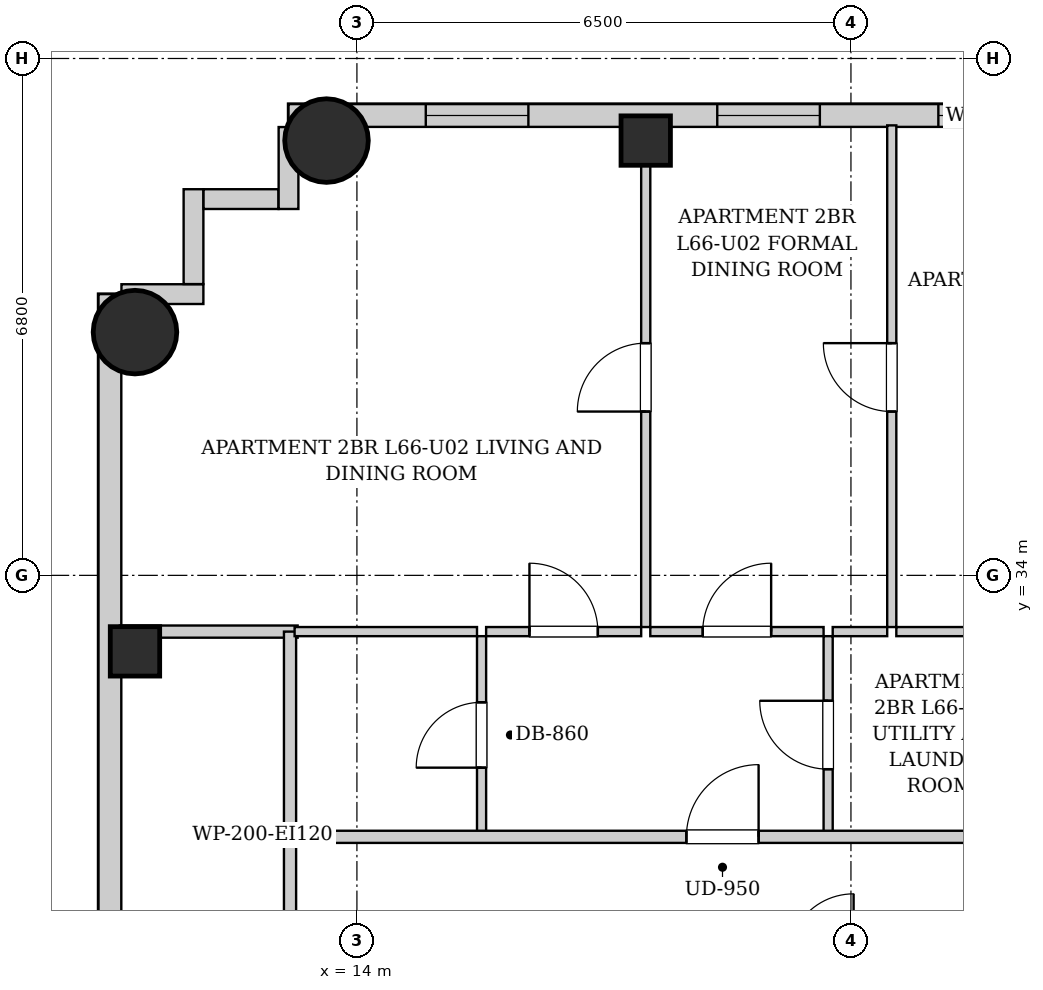
"""IFC4 building model, lengths in metres.
Left out: names, types, materials, properties, quantities, classifications, styles, units other than length and angle.
Written with IfcOpenShell. Run it as: python <this file> out.ifc"""

import sys

from ifc_helpers import new_model, si_unit, direction, frame, frame_2d, origin, origin_2d, place, context, subcontext, project, spatial, rectangle, circle, extrude, element, fill, save


model = new_model("IFC4")
c1 = context("Model", 3, precision=1e-05, world=origin(), true_north=direction((0.0, 1.0)))
c2 = subcontext(c1, "Body", "Model", "MODEL_VIEW")
j1 = project(units=[si_unit("LENGTHUNIT", "METRE"), si_unit("PLANEANGLEUNIT", "RADIAN")], contexts=[c1])
p1 = place(None, origin())
s1 = spatial("IfcSite", under=j1, at=p1, CompositionType="ELEMENT")
p2 = place(p1, origin())
s2 = spatial("IfcBuilding", under=s1, at=p2, CompositionType="ELEMENT")
p3 = place(p2, frame((0.0, 0.0, 227.5)))
s3 = spatial("IfcBuildingStorey", under=s2, at=p3, CompositionType="ELEMENT", Elevation=227.5)
p4 = place(p3, frame((13.6, 39.72, 0.0), z_axis=(0.0, 0.0, 1.0), x_axis=(1.0, 0.0, 0.0)))
e1 = element("IfcColumn", 1, at=p4, inside=s3, PredefinedType="COLUMN", context=c2, shape_type="SweptSolid", body=[
    extrude(circle(Radius=0.55, at=origin_2d()), origin(), (0.0, 0.0, 1.0), 3.4),
])
for number, where, z_axis, x_axis in (
    (2, (17.8, 39.72, 0.0), (0.0, 0.0, 1.0), (1.0, 0.0, 0.0)),
    (3, (11.08, 33.0, 0.0), (0.0, 0.0, 1.0), (1.0, 0.0, 0.0)),
):
    element("IfcColumn", number, at=place(p3, frame(where, z_axis=z_axis, x_axis=x_axis)), inside=s3, PredefinedType="COLUMN", context=c2, shape_type="SweptSolid", body=[
        extrude(rectangle(XDim=0.65, YDim=0.65, at=origin_2d()), origin(), (0.0, 0.0, 1.0), 3.4),
    ])
p5 = place(p3, frame((11.08, 37.2, 0.0), z_axis=(0.0, 0.0, 1.0), x_axis=(1.0, 0.0, 0.0)))
e4 = element("IfcColumn", 4, at=p5, inside=s3, PredefinedType="COLUMN", context=c2, shape_type="SweptSolid", body=[
    extrude(circle(Radius=0.55, at=origin_2d()), origin(), (0.0, 0.0, 1.0), 3.4),
])
p6 = place(p3, frame((13.1, 40.05, 0.0), z_axis=(0.0, 0.0, 1.0), x_axis=(1.0, 0.0, 0.0)))
e5 = element("IfcWall", 5, at=p6, inside=s3, PredefinedType="SOLIDWALL", context=c2, shape_type="SweptSolid", body=[
    extrude(rectangle(XDim=18.8, YDim=0.3, at=frame_2d((9.4, 0.0))), origin(), (0.0, 0.0, 1.0), 3.14),
])
p7 = place(p6, frame((1.806, 0.0, 0.55)))
e6 = element("IfcOpeningElement", 6, at=p7, cuts=e5, PredefinedType="OPENING", context=c2, shape_type="SweptSolid", body=[
    extrude(rectangle(XDim=1.35, YDim=1.2, at=frame_2d((0.675, 0.6))), frame((0.0, 0.16, 0.0), z_axis=(0.0, -1.0, 0.0), x_axis=(1.0, 0.0, 0.0)), (0.0, 0.0, 1.0), 0.32),
])
p8 = place(p6, frame((5.641, 0.0, 0.55)))
e7 = element("IfcOpeningElement", 7, at=p8, cuts=e5, PredefinedType="OPENING", context=c2, shape_type="SweptSolid", body=[
    extrude(rectangle(XDim=1.35, YDim=1.2, at=frame_2d((0.675, 0.6))), frame((0.0, 0.16, 0.0), z_axis=(0.0, -1.0, 0.0), x_axis=(1.0, 0.0, 0.0)), (0.0, 0.0, 1.0), 0.32),
])
p9 = place(p6, frame((8.55, 0.0, 0.55)))
e8 = element("IfcOpeningElement", 8, at=p9, cuts=e5, PredefinedType="OPENING", context=c2, shape_type="SweptSolid", body=[
    extrude(rectangle(XDim=0.85, YDim=1.2, at=frame_2d((0.425, 0.6))), frame((0.0, 0.16, 0.0), z_axis=(0.0, -1.0, 0.0), x_axis=(1.0, 0.0, 0.0)), (0.0, 0.0, 1.0), 0.32),
])
p10 = place(p6, frame((14.4, 0.0, 0.55)))
e9 = element("IfcOpeningElement", 9, at=p10, cuts=e5, PredefinedType="OPENING", context=c2, shape_type="SweptSolid", body=[
    extrude(rectangle(XDim=1.35, YDim=1.2, at=frame_2d((0.675, 0.6))), frame((0.0, 0.16, 0.0), z_axis=(0.0, -1.0, 0.0), x_axis=(1.0, 0.0, 0.0)), (0.0, 0.0, 1.0), 0.32),
])
p11 = place(p3, frame((10.75, 6.3, 0.0), z_axis=(0.0, 0.0, 1.0), x_axis=(0.0, 1.0, 0.0)))
e10 = element("IfcWall", 10, at=p11, inside=s3, PredefinedType="SOLIDWALL", context=c2, shape_type="SweptSolid", body=[
    extrude(rectangle(XDim=31.4, YDim=0.3, at=frame_2d((15.7, 0.0))), origin(), (0.0, 0.0, 1.0), 3.14),
])
p12 = place(p11, frame((1.653, 0.0, 0.55)))
e11 = element("IfcOpeningElement", 11, at=p12, cuts=e10, PredefinedType="OPENING", context=c2, shape_type="SweptSolid", body=[
    extrude(rectangle(XDim=1.35, YDim=1.2, at=frame_2d((0.675, 0.6))), frame((0.0, 0.16, 0.0), z_axis=(0.0, -1.0, 0.0), x_axis=(1.0, 0.0, 0.0)), (0.0, 0.0, 1.0), 0.32),
])
p13 = place(p11, frame((10.367, 0.0, 0.55)))
e12 = element("IfcOpeningElement", 12, at=p13, cuts=e10, PredefinedType="OPENING", context=c2, shape_type="SweptSolid", body=[
    extrude(rectangle(XDim=1.35, YDim=1.2, at=frame_2d((0.675, 0.6))), frame((0.0, 0.16, 0.0), z_axis=(0.0, -1.0, 0.0), x_axis=(1.0, 0.0, 0.0)), (0.0, 0.0, 1.0), 0.32),
])
p14 = place(p11, frame((19.683, 0.0, 0.55)))
e13 = element("IfcOpeningElement", 13, at=p14, cuts=e10, PredefinedType="OPENING", context=c2, shape_type="SweptSolid", body=[
    extrude(rectangle(XDim=1.35, YDim=1.2, at=frame_2d((0.675, 0.6))), frame((0.0, 0.16, 0.0), z_axis=(0.0, -1.0, 0.0), x_axis=(1.0, 0.0, 0.0)), (0.0, 0.0, 1.0), 0.32),
])
p15 = place(p3, frame((10.902, 37.7, 0.0), z_axis=(0.0, 0.0, 1.0), x_axis=(1.0, 0.0, 0.0)))
e14 = element("IfcWall", 14, at=p15, inside=s3, PredefinedType="SOLIDWALL", context=c2, shape_type="SweptSolid", body=[
    extrude(rectangle(XDim=1.078, YDim=0.26, at=frame_2d((0.539, 0.0))), origin(), (0.0, 0.0, 1.0), 3.14),
])
p16 = place(p3, frame((11.85, 37.832, 0.0), z_axis=(0.0, 0.0, 1.0), x_axis=(0.0, 1.0, 0.0)))
e15 = element("IfcWall", 15, at=p16, inside=s3, PredefinedType="SOLIDWALL", context=c2, shape_type="SweptSolid", body=[
    extrude(rectangle(XDim=1.248, YDim=0.26, at=frame_2d((0.624, 0.0))), origin(), (0.0, 0.0, 1.0), 3.14),
])
p17 = place(p3, frame((11.982, 38.95, 0.0), z_axis=(0.0, 0.0, 1.0), x_axis=(1.0, 0.0, 0.0)))
e16 = element("IfcWall", 16, at=p17, inside=s3, PredefinedType="SOLIDWALL", context=c2, shape_type="SweptSolid", body=[
    extrude(rectangle(XDim=0.986, YDim=0.26, at=frame_2d((0.493, 0.0))), origin(), (0.0, 0.0, 1.0), 3.14),
])
p18 = place(p3, frame((13.1, 38.82, 0.0), z_axis=(0.0, 0.0, 1.0), x_axis=(0.0, 1.0, 0.0)))
e17 = element("IfcWall", 17, at=p18, inside=s3, PredefinedType="SOLIDWALL", context=c2, shape_type="SweptSolid", body=[
    extrude(rectangle(XDim=1.078, YDim=0.26, at=frame_2d((0.539, 0.0))), origin(), (0.0, 0.0, 1.0), 3.14),
])
p19 = place(p3, frame((13.12, 28.98, 0.0), z_axis=(0.0, 0.0, 1.0), x_axis=(0.0, 1.0, 0.0)))
e18 = element("IfcWall", 18, at=p19, inside=s3, PredefinedType="PARTITIONING", context=c2, shape_type="SweptSolid", body=[
    extrude(rectangle(XDim=1.58, YDim=0.16, at=frame_2d((0.79, 0.0))), origin(), (0.0, 0.0, 1.0), 3.14),
])
p20 = place(p3, frame((10.88, 33.26, 0.0), z_axis=(0.0, 0.0, 1.0), x_axis=(1.0, 0.0, 0.0)))
e19 = element("IfcWall", 19, at=p20, inside=s3, PredefinedType="PARTITIONING", context=c2, shape_type="SweptSolid", body=[
    extrude(rectangle(XDim=2.34, YDim=0.16, at=frame_2d((1.17, 0.0))), origin(), (0.0, 0.0, 1.0), 3.14),
])
p21 = place(p3, frame((13.12, 30.6, 0.0), z_axis=(0.0, 0.0, 1.0), x_axis=(0.0, 1.0, 0.0)))
e20 = element("IfcWall", 20, at=p21, inside=s3, PredefinedType="PARTITIONING", context=c2, shape_type="SweptSolid", body=[
    extrude(rectangle(XDim=2.66, YDim=0.16, at=frame_2d((1.33, 0.0))), origin(), (0.0, 0.0, 1.0), 3.14),
])
p22 = place(p3, frame((15.64, 30.6, 0.0), z_axis=(0.0, 0.0, 1.0), x_axis=(0.0, 1.0, 0.0)))
e21 = element("IfcWall", 21, at=p22, inside=s3, PredefinedType="PARTITIONING", context=c2, shape_type="SweptSolid", body=[
    extrude(rectangle(XDim=2.6, YDim=0.12, at=frame_2d((1.3, 0.0))), origin(), (0.0, 0.0, 1.0), 3.14),
])
p23 = place(p22, frame((0.87, 0.0, 0.0)))
e22 = element("IfcOpeningElement", 22, at=p23, cuts=e21, PredefinedType="OPENING", context=c2, shape_type="SweptSolid", body=[
    extrude(rectangle(XDim=0.86, YDim=2.05, at=frame_2d((0.43, 1.025))), frame((0.0, 0.07, 0.0), z_axis=(0.0, -1.0, 0.0), x_axis=(1.0, 0.0, 0.0)), (0.0, 0.0, 1.0), 0.14),
])
p24 = place(p3, frame((13.18, 33.26, 0.0), z_axis=(0.0, 0.0, 1.0), x_axis=(1.0, 0.0, 0.0)))
e23 = element("IfcWall", 23, at=p24, inside=s3, PredefinedType="PARTITIONING", context=c2, shape_type="SweptSolid", body=[
    extrude(rectangle(XDim=2.4, YDim=0.12, at=frame_2d((1.2, 0.0))), origin(), (0.0, 0.0, 1.0), 3.14),
])
p25 = place(p3, frame((20.2, 30.6, 0.0), z_axis=(0.0, 0.0, 1.0), x_axis=(0.0, 1.0, 0.0)))
e24 = element("IfcWall", 24, at=p25, inside=s3, PredefinedType="PARTITIONING", context=c2, shape_type="SweptSolid", body=[
    extrude(rectangle(XDim=2.6, YDim=0.12, at=frame_2d((1.3, 0.0))), origin(), (0.0, 0.0, 1.0), 3.14),
])
p26 = place(p25, frame((0.85, 0.0, 0.0)))
e25 = element("IfcOpeningElement", 25, at=p26, cuts=e24, PredefinedType="OPENING", context=c2, shape_type="SweptSolid", body=[
    extrude(rectangle(XDim=0.9, YDim=2.05, at=frame_2d((0.45, 1.025))), frame((0.0, 0.07, 0.0), z_axis=(0.0, -1.0, 0.0), x_axis=(1.0, 0.0, 0.0)), (0.0, 0.0, 1.0), 0.14),
])
p27 = place(p3, frame((15.7, 33.26, 0.0), z_axis=(0.0, 0.0, 1.0), x_axis=(1.0, 0.0, 0.0)))
e26 = element("IfcWall", 26, at=p27, inside=s3, PredefinedType="PARTITIONING", context=c2, shape_type="SweptSolid", body=[
    extrude(rectangle(XDim=2.04, YDim=0.12, at=frame_2d((1.02, 0.0))), origin(), (0.0, 0.0, 1.0), 3.14),
])
p28 = place(p27, frame((0.57, 0.0, 0.0)))
e27 = element("IfcOpeningElement", 27, at=p28, cuts=e26, PredefinedType="OPENING", context=c2, shape_type="SweptSolid", body=[
    extrude(rectangle(XDim=0.9, YDim=2.05, at=frame_2d((0.45, 1.025))), frame((0.0, 0.07, 0.0), z_axis=(0.0, -1.0, 0.0), x_axis=(1.0, 0.0, 0.0)), (0.0, 0.0, 1.0), 0.14),
])
p29 = place(p3, frame((17.86, 33.26, 0.0), z_axis=(0.0, 0.0, 1.0), x_axis=(1.0, 0.0, 0.0)))
e28 = element("IfcWall", 28, at=p29, inside=s3, PredefinedType="PARTITIONING", context=c2, shape_type="SweptSolid", body=[
    extrude(rectangle(XDim=2.28, YDim=0.12, at=frame_2d((1.14, 0.0))), origin(), (0.0, 0.0, 1.0), 3.14),
])
p30 = place(p29, frame((0.69, 0.0, 0.0)))
e29 = element("IfcOpeningElement", 29, at=p30, cuts=e28, PredefinedType="OPENING", context=c2, shape_type="SweptSolid", body=[
    extrude(rectangle(XDim=0.9, YDim=2.05, at=frame_2d((0.45, 1.025))), frame((0.0, 0.07, 0.0), z_axis=(0.0, -1.0, 0.0), x_axis=(1.0, 0.0, 0.0)), (0.0, 0.0, 1.0), 0.14),
])
p31 = place(p3, frame((20.26, 33.26, 0.0), z_axis=(0.0, 0.0, 1.0), x_axis=(1.0, 0.0, 0.0)))
e30 = element("IfcWall", 30, at=p31, inside=s3, PredefinedType="PARTITIONING", context=c2, shape_type="SweptSolid", body=[
    extrude(rectangle(XDim=0.717, YDim=0.12, at=frame_2d((0.358, 0.0))), origin(), (0.0, 0.0, 1.0), 3.14),
])
p32 = place(p3, frame((21.097, 33.26, 0.0), z_axis=(0.0, 0.0, 1.0), x_axis=(1.0, 0.0, 0.0)))
e31 = element("IfcWall", 31, at=p32, inside=s3, PredefinedType="PARTITIONING", context=c2, shape_type="SweptSolid", body=[
    extrude(rectangle(XDim=2.763, YDim=0.12, at=frame_2d((1.382, 0.0))), origin(), (0.0, 0.0, 1.0), 3.14),
])
p33 = place(p32, frame((0.931, 0.0, 0.0)))
e32 = element("IfcOpeningElement", 32, at=p33, cuts=e31, PredefinedType="OPENING", context=c2, shape_type="SweptSolid", body=[
    extrude(rectangle(XDim=0.9, YDim=2.05, at=frame_2d((0.45, 1.025))), frame((0.0, 0.07, 0.0), z_axis=(0.0, -1.0, 0.0), x_axis=(1.0, 0.0, 0.0)), (0.0, 0.0, 1.0), 0.14),
])
p34 = place(p3, frame((17.8, 33.32, 0.0), z_axis=(0.0, 0.0, 1.0), x_axis=(0.0, 1.0, 0.0)))
e33 = element("IfcWall", 33, at=p34, inside=s3, PredefinedType="PARTITIONING", context=c2, shape_type="SweptSolid", body=[
    extrude(rectangle(XDim=6.6, YDim=0.12, at=frame_2d((3.3, 0.0))), origin(), (0.0, 0.0, 1.0), 2.668),
])
p35 = place(p34, frame((2.835, 0.0, 0.0)))
e34 = element("IfcOpeningElement", 34, at=p35, cuts=e33, PredefinedType="OPENING", context=c2, shape_type="SweptSolid", body=[
    extrude(rectangle(XDim=0.9, YDim=2.05, at=frame_2d((0.45, 1.025))), frame((0.0, 0.07, 0.0), z_axis=(0.0, -1.0, 0.0), x_axis=(1.0, 0.0, 0.0)), (0.0, 0.0, 1.0), 0.14),
])
p36 = place(p3, frame((21.037, 33.32, 0.0), z_axis=(0.0, 0.0, 1.0), x_axis=(0.0, 1.0, 0.0)))
e35 = element("IfcWall", 35, at=p36, inside=s3, PredefinedType="PARTITIONING", context=c2, shape_type="SweptSolid", body=[
    extrude(rectangle(XDim=6.6, YDim=0.12, at=frame_2d((3.3, 0.0))), origin(), (0.0, 0.0, 1.0), 3.14),
])
p37 = place(p36, frame((2.835, 0.0, 0.0)))
e36 = element("IfcOpeningElement", 36, at=p37, cuts=e35, PredefinedType="OPENING", context=c2, shape_type="SweptSolid", body=[
    extrude(rectangle(XDim=0.9, YDim=2.05, at=frame_2d((0.45, 1.025))), frame((0.0, 0.07, 0.0), z_axis=(0.0, -1.0, 0.0), x_axis=(1.0, 0.0, 0.0)), (0.0, 0.0, 1.0), 0.14),
])
p38 = place(p3, frame((13.15, 30.56, 0.0), z_axis=(0.0, 0.0, 1.0), x_axis=(1.0, 0.0, 0.0)))
e37 = element("IfcWall", 37, at=p38, inside=s3, PredefinedType="PARTITIONING", context=c2, shape_type="SweptSolid", body=[
    extrude(rectangle(XDim=24.6, YDim=0.16, at=frame_2d((12.3, 0.0))), origin(), (0.0, 0.0, 1.0), 3.14),
])
p39 = place(p38, frame((5.185, 0.0, 0.0)))
e38 = element("IfcOpeningElement", 38, at=p39, cuts=e37, PredefinedType="OPENING", context=c2, shape_type="SweptSolid", body=[
    extrude(rectangle(XDim=0.95, YDim=2.1, at=frame_2d((0.475, 1.05))), frame((0.0, 0.09, 0.0), z_axis=(0.0, -1.0, 0.0), x_axis=(1.0, 0.0, 0.0)), (0.0, 0.0, 1.0), 0.18),
])
p40 = place(p38, frame((21.55, 0.0, 0.0)))
e39 = element("IfcOpeningElement", 39, at=p40, cuts=e37, PredefinedType="OPENING", context=c2, shape_type="SweptSolid", body=[
    extrude(rectangle(XDim=0.95, YDim=2.1, at=frame_2d((0.475, 1.05))), frame((0.0, 0.09, 0.0), z_axis=(0.0, -1.0, 0.0), x_axis=(1.0, 0.0, 0.0)), (0.0, 0.0, 1.0), 0.18),
])
p41 = place(p23, origin())
e40 = element("IfcDoor", 40, at=p41, inside=s3, OperationType="SINGLE_SWING_LEFT", PredefinedType="DOOR", context=c2, shape_type="SweptSolid", body=[
    extrude(rectangle(XDim=0.86, YDim=2.05, at=frame_2d((0.43, 1.025))), frame((0.0, 0.025, 0.0), z_axis=(0.0, -1.0, 0.0), x_axis=(1.0, 0.0, 0.0)), (0.0, 0.0, 1.0), 0.05),
])
fill(e22, e40)
p42 = place(p26, origin())
e41 = element("IfcDoor", 41, at=p42, inside=s3, OperationType="SINGLE_SWING_RIGHT", PredefinedType="DOOR", context=c2, shape_type="SweptSolid", body=[
    extrude(rectangle(XDim=0.9, YDim=2.05, at=frame_2d((0.45, 1.025))), frame((0.0, 0.025, 0.0), z_axis=(0.0, -1.0, 0.0), x_axis=(1.0, 0.0, 0.0)), (0.0, 0.0, 1.0), 0.05),
])
fill(e25, e41)
p43 = place(p28, origin())
e42 = element("IfcDoor", 42, at=p43, inside=s3, OperationType="SINGLE_SWING_LEFT", PredefinedType="DOOR", context=c2, shape_type="SweptSolid", body=[
    extrude(rectangle(XDim=0.9, YDim=2.05, at=frame_2d((0.45, 1.025))), frame((0.0, 0.025, 0.0), z_axis=(0.0, -1.0, 0.0), x_axis=(1.0, 0.0, 0.0)), (0.0, 0.0, 1.0), 0.05),
])
fill(e27, e42)
p44 = place(p30, origin())
e43 = element("IfcDoor", 43, at=p44, inside=s3, OperationType="SINGLE_SWING_RIGHT", PredefinedType="DOOR", context=c2, shape_type="SweptSolid", body=[
    extrude(rectangle(XDim=0.9, YDim=2.05, at=frame_2d((0.45, 1.025))), frame((0.0, 0.025, 0.0), z_axis=(0.0, -1.0, 0.0), x_axis=(1.0, 0.0, 0.0)), (0.0, 0.0, 1.0), 0.05),
])
fill(e29, e43)
p45 = place(p35, origin())
e44 = element("IfcDoor", 44, at=p45, inside=s3, OperationType="SINGLE_SWING_LEFT", PredefinedType="DOOR", context=c2, shape_type="SweptSolid", body=[
    extrude(rectangle(XDim=0.9, YDim=2.05, at=frame_2d((0.45, 1.025))), frame((0.0, 0.025, 0.0), z_axis=(0.0, -1.0, 0.0), x_axis=(1.0, 0.0, 0.0)), (0.0, 0.0, 1.0), 0.05),
])
fill(e34, e44)
p46 = place(p37, origin())
e45 = element("IfcDoor", 45, at=p46, inside=s3, OperationType="SINGLE_SWING_RIGHT", PredefinedType="DOOR", context=c2, shape_type="SweptSolid", body=[
    extrude(rectangle(XDim=0.9, YDim=2.05, at=frame_2d((0.45, 1.025))), frame((0.0, 0.025, 0.0), z_axis=(0.0, -1.0, 0.0), x_axis=(1.0, 0.0, 0.0)), (0.0, 0.0, 1.0), 0.05),
])
fill(e36, e45)
p47 = place(p39, origin())
e46 = element("IfcDoor", 46, at=p47, inside=s3, OperationType="SINGLE_SWING_RIGHT", PredefinedType="DOOR", context=c2, shape_type="SweptSolid", body=[
    extrude(rectangle(XDim=0.95, YDim=2.1, at=frame_2d((0.475, 1.05))), frame((0.0, 0.025, 0.0), z_axis=(0.0, -1.0, 0.0), x_axis=(1.0, 0.0, 0.0)), (0.0, 0.0, 1.0), 0.05),
])
fill(e38, e46)
p48 = place(p7, origin())
e47 = element("IfcWindow", 47, at=p48, inside=s3, PartitioningType="SINGLE_PANEL", PredefinedType="WINDOW", context=c2, shape_type="SweptSolid", body=[
    extrude(rectangle(XDim=1.35, YDim=1.2, at=frame_2d((0.675, 0.6))), frame((0.0, 0.03, 0.0), z_axis=(0.0, -1.0, 0.0), x_axis=(1.0, 0.0, 0.0)), (0.0, 0.0, 1.0), 0.06),
])
fill(e6, e47)
p49 = place(p8, origin())
e48 = element("IfcWindow", 48, at=p49, inside=s3, PartitioningType="SINGLE_PANEL", PredefinedType="WINDOW", context=c2, shape_type="SweptSolid", body=[
    extrude(rectangle(XDim=1.35, YDim=1.2, at=frame_2d((0.675, 0.6))), frame((0.0, 0.03, 0.0), z_axis=(0.0, -1.0, 0.0), x_axis=(1.0, 0.0, 0.0)), (0.0, 0.0, 1.0), 0.06),
])
fill(e7, e48)
p50 = place(p9, origin())
e49 = element("IfcWindow", 49, at=p50, inside=s3, PartitioningType="SINGLE_PANEL", PredefinedType="WINDOW", context=c2, shape_type="SweptSolid", body=[
    extrude(rectangle(XDim=0.85, YDim=1.2, at=frame_2d((0.425, 0.6))), frame((0.0, 0.03, 0.0), z_axis=(0.0, -1.0, 0.0), x_axis=(1.0, 0.0, 0.0)), (0.0, 0.0, 1.0), 0.06),
])
fill(e8, e49)
save(model, sys.argv[1])
